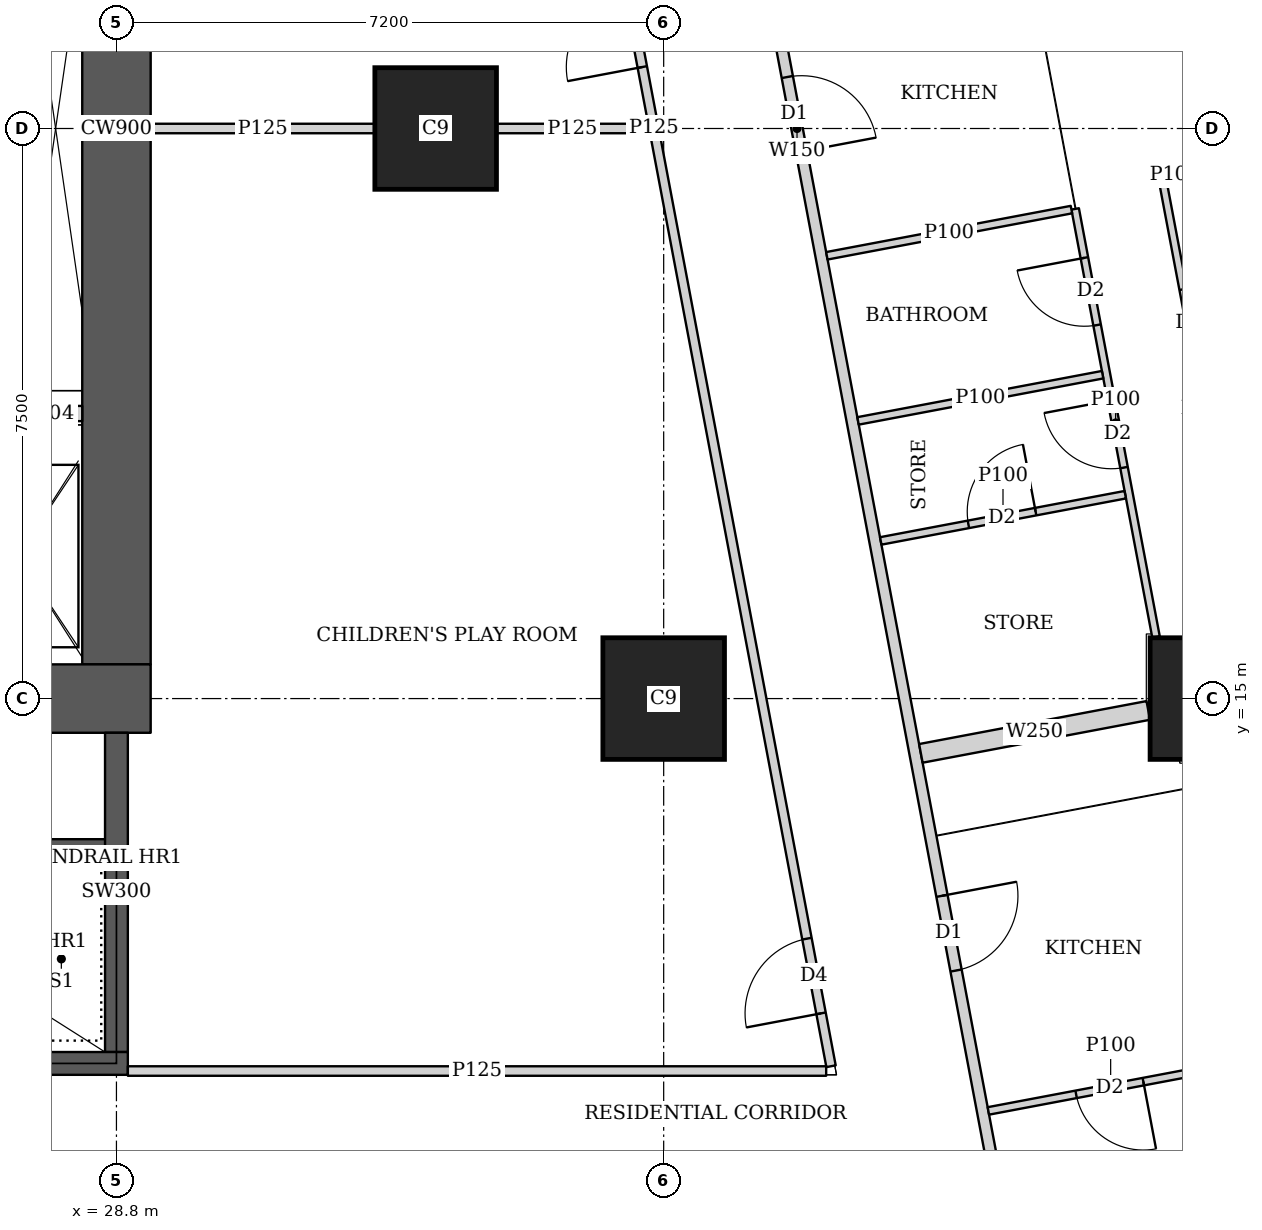
"""IFC4 building model, lengths in metres.
Left out: names, types, materials, properties, quantities, classifications, styles, units other than length and angle.
Written with IfcOpenShell. Run it as: python <this file> out.ifc"""

import sys

from ifc_helpers import new_model, si_unit, direction, frame, frame_2d, origin, origin_2d, place, context, subcontext, project, spatial, rectangle, extrude, element, fill, save


model = new_model("IFC4")
c1 = context("Model", 3, precision=1e-05, world=origin(), true_north=direction((0.0, 1.0)))
c2 = subcontext(c1, "Body", "Model", "MODEL_VIEW")
j1 = project(units=[si_unit("LENGTHUNIT", "METRE"), si_unit("PLANEANGLEUNIT", "RADIAN")], contexts=[c1])
p1 = place(None, origin())
s1 = spatial("IfcSite", under=j1, at=p1, CompositionType="ELEMENT")
p2 = place(p1, origin())
s2 = spatial("IfcBuilding", under=s1, at=p2, CompositionType="ELEMENT")
p3 = place(p2, frame((0.0, 0.0, 122.9)))
s3 = spatial("IfcBuildingStorey", under=s2, at=p3, CompositionType="ELEMENT", Elevation=122.9)
for number, where, z_axis, x_axis in (
    (1, (36.0, 15.0, 0.0), (0.0, 0.0, 1.0), (1.0, 0.0, 0.0)),
    (2, (43.2, 15.0, 0.0), (0.0, 0.0, 1.0), (1.0, 0.0, 0.0)),
    (3, (33.0, 22.5, 0.0), (0.0, 0.0, 1.0), (1.0, 0.0, 0.0)),
):
    element("IfcColumn", number, at=place(p3, frame(where, z_axis=z_axis, x_axis=x_axis)), inside=s3, PredefinedType="COLUMN", context=c2, shape_type="SweptSolid", body=[
        extrude(rectangle(XDim=1.6, YDim=1.6, at=origin_2d()), origin(), (0.0, 0.0, 1.0), 3.75),
    ])
p4 = place(p3, frame((13.95, 15.0, 0.0), z_axis=(0.0, 0.0, 1.0), x_axis=(1.0, 0.0, 0.0)))
e4 = element("IfcWall", 4, at=p4, inside=s3, PredefinedType="SHEAR", context=c2, shape_type="SweptSolid", body=[
    extrude(rectangle(XDim=15.3, YDim=0.9, at=frame_2d((7.65, 0.0))), origin(), (0.0, 0.0, 1.0), 3.75),
])
p5 = place(p4, frame((4.45, 0.0, 0.0)))
e5 = element("IfcOpeningElement", 5, at=p5, cuts=e4, PredefinedType="OPENING", context=c2, shape_type="SweptSolid", body=[
    extrude(rectangle(XDim=1.8, YDim=2.1, at=frame_2d((0.9, 1.05))), frame((0.0, 0.46, 0.0), z_axis=(0.0, -1.0, 0.0), x_axis=(1.0, 0.0, 0.0)), (0.0, 0.0, 1.0), 0.92),
])
p6 = place(p4, frame((10.7, 0.0, 0.0)))
e6 = element("IfcOpeningElement", 6, at=p6, cuts=e4, PredefinedType="OPENING", context=c2, shape_type="SweptSolid", body=[
    extrude(rectangle(XDim=1.1, YDim=2.1, at=frame_2d((0.55, 1.05))), frame((0.0, 0.46, 0.0), z_axis=(0.0, -1.0, 0.0), x_axis=(1.0, 0.0, 0.0)), (0.0, 0.0, 1.0), 0.92),
])
p7 = place(p3, frame((28.8, 15.45, 0.0), z_axis=(0.0, 0.0, 1.0), x_axis=(0.0, 1.0, 0.0)))
e7 = element("IfcWall", 7, at=p7, inside=s3, PredefinedType="SHEAR", context=c2, shape_type="SweptSolid", body=[
    extrude(rectangle(XDim=14.1, YDim=0.9, at=frame_2d((7.05, 0.0))), origin(), (0.0, 0.0, 1.0), 3.75),
])
p8 = place(p3, frame((21.45, 10.2, 0.0), z_axis=(0.0, 0.0, 1.0), x_axis=(1.0, 0.0, 0.0)))
e8 = element("IfcWall", 8, at=p8, inside=s3, PredefinedType="SHEAR", context=c2, shape_type="SweptSolid", body=[
    extrude(rectangle(XDim=7.5, YDim=0.3, at=frame_2d((3.75, 0.0))), origin(), (0.0, 0.0, 1.0), 3.75),
])
p9 = place(p8, frame((0.5, 0.0, 0.0)))
e9 = element("IfcOpeningElement", 9, at=p9, cuts=e8, PredefinedType="OPENING", context=c2, shape_type="SweptSolid", body=[
    extrude(rectangle(XDim=1.1, YDim=2.1, at=frame_2d((0.55, 1.05))), frame((0.0, 0.16, 0.0), z_axis=(0.0, -1.0, 0.0), x_axis=(1.0, 0.0, 0.0)), (0.0, 0.0, 1.0), 0.32),
])
p10 = place(p3, frame((28.8, 10.35, 0.0), z_axis=(0.0, 0.0, 1.0), x_axis=(0.0, 1.0, 0.0)))
e10 = element("IfcWall", 10, at=p10, inside=s3, PredefinedType="SHEAR", context=c2, shape_type="SweptSolid", body=[
    extrude(rectangle(XDim=4.2, YDim=0.3, at=frame_2d((2.1, 0.0))), origin(), (0.0, 0.0, 1.0), 3.75),
])
p11 = place(p3, frame((33.382, 45.65, 0.0), z_axis=(0.0, 0.0, 1.0), x_axis=(0.185593544777, -0.982626600565, 0.0)))
e11 = element("IfcWall", 11, at=p11, inside=s3, PredefinedType="SOLIDWALL", context=c2, shape_type="SweptSolid", body=[
    extrude(rectangle(XDim=47.118, YDim=0.15, at=frame_2d((23.559, 0.0))), origin(), (0.0, 0.0, 1.0), 2.2),
])
p12 = place(p11, frame((10.662, 0.0, 0.0)))
e12 = element("IfcOpeningElement", 12, at=p12, cuts=e11, PredefinedType="OPENING", context=c2, shape_type="SweptSolid", body=[
    extrude(rectangle(XDim=1.0, YDim=2.1, at=frame_2d((0.5, 1.05))), frame((0.0, 0.085, 0.0), z_axis=(0.0, -1.0, 0.0), x_axis=(1.0, 0.0, 0.0)), (0.0, 0.0, 1.0), 0.17),
])
p13 = place(p11, frame((15.237, 0.0, 0.0)))
e13 = element("IfcOpeningElement", 13, at=p13, cuts=e11, PredefinedType="OPENING", context=c2, shape_type="SweptSolid", body=[
    extrude(rectangle(XDim=1.0, YDim=2.1, at=frame_2d((0.5, 1.05))), frame((0.0, 0.085, 0.0), z_axis=(0.0, -1.0, 0.0), x_axis=(1.0, 0.0, 0.0)), (0.0, 0.0, 1.0), 0.17),
])
p14 = place(p11, frame((22.87, 0.0, 0.0)))
e14 = element("IfcOpeningElement", 14, at=p14, cuts=e11, PredefinedType="OPENING", context=c2, shape_type="SweptSolid", body=[
    extrude(rectangle(XDim=1.0, YDim=2.1, at=frame_2d((0.5, 1.05))), frame((0.0, 0.085, 0.0), z_axis=(0.0, -1.0, 0.0), x_axis=(1.0, 0.0, 0.0)), (0.0, 0.0, 1.0), 0.17),
])
p15 = place(p11, frame((33.833, 0.0, 0.0)))
e15 = element("IfcOpeningElement", 15, at=p15, cuts=e11, PredefinedType="OPENING", context=c2, shape_type="SweptSolid", body=[
    extrude(rectangle(XDim=1.0, YDim=2.1, at=frame_2d((0.5, 1.05))), frame((0.0, 0.085, 0.0), z_axis=(0.0, -1.0, 0.0), x_axis=(1.0, 0.0, 0.0)), (0.0, 0.0, 1.0), 0.17),
])
p16 = place(p3, frame((42.566, 21.809, 0.0), z_axis=(0.0, 0.0, 1.0), x_axis=(0.18559218796, -0.982626856832, 0.0)))
e16 = element("IfcWall", 16, at=p16, inside=s3, PredefinedType="PARTITIONING", context=c2, shape_type="SweptSolid", body=[
    extrude(rectangle(XDim=6.105, YDim=0.1, at=frame_2d((3.052, 0.0))), origin(), (0.0, 0.0, 1.0), 2.5),
])
p17 = place(p16, frame((1.45, 0.0, 0.0)))
e17 = element("IfcOpeningElement", 17, at=p17, cuts=e16, PredefinedType="OPENING", context=c2, shape_type="SweptSolid", body=[
    extrude(rectangle(XDim=0.9, YDim=2.1, at=frame_2d((0.45, 1.05))), frame((0.0, 0.06, 0.0), z_axis=(0.0, -1.0, 0.0), x_axis=(1.0, 0.0, 0.0)), (0.0, 0.0, 1.0), 0.12),
])
p18 = place(p16, frame((4.163, 0.0, 0.0)))
e18 = element("IfcOpeningElement", 18, at=p18, cuts=e16, PredefinedType="OPENING", context=c2, shape_type="SweptSolid", body=[
    extrude(rectangle(XDim=0.9, YDim=2.1, at=frame_2d((0.45, 1.05))), frame((0.0, 0.06, 0.0), z_axis=(0.0, -1.0, 0.0), x_axis=(1.0, 0.0, 0.0)), (0.0, 0.0, 1.0), 0.12),
])
p19 = place(p3, frame((41.414, 21.442, 0.0), z_axis=(0.0, 0.0, 1.0), x_axis=(0.185636022079, -0.982618576716, 0.0)))
e19 = element("IfcWall", 19, at=p19, inside=s3, PredefinedType="PARTITIONING", context=c2, shape_type="SweptSolid", body=[
    extrude(rectangle(XDim=5.731, YDim=0.1, at=frame_2d((2.866, 0.0))), origin(), (0.0, 0.0, 1.0), 3.5),
])
p20 = place(p19, frame((0.655, 0.0, 0.0)))
e20 = element("IfcOpeningElement", 20, at=p20, cuts=e19, PredefinedType="OPENING", context=c2, shape_type="SweptSolid", body=[
    extrude(rectangle(XDim=0.9, YDim=2.1, at=frame_2d((0.45, 1.05))), frame((0.0, 0.06, 0.0), z_axis=(0.0, -1.0, 0.0), x_axis=(1.0, 0.0, 0.0)), (0.0, 0.0, 1.0), 0.12),
])
p21 = place(p19, frame((2.563, 0.0, 0.0)))
e21 = element("IfcOpeningElement", 21, at=p21, cuts=e19, PredefinedType="OPENING", context=c2, shape_type="SweptSolid", body=[
    extrude(rectangle(XDim=0.9, YDim=2.1, at=frame_2d((0.45, 1.05))), frame((0.0, 0.06, 0.0), z_axis=(0.0, -1.0, 0.0), x_axis=(1.0, 0.0, 0.0)), (0.0, 0.0, 1.0), 0.12),
])
p22 = place(p3, frame((42.887, 21.921, 0.0), z_axis=(0.0, 0.0, 1.0), x_axis=(-0.982274918032, -0.187445953293, 0.0)))
e22 = element("IfcWall", 22, at=p22, inside=s3, PredefinedType="PARTITIONING", context=c2, shape_type="SweptSolid", body=[
    extrude(rectangle(XDim=0.336, YDim=0.1, at=frame_2d((0.168, 0.0))), origin(), (0.0, 0.0, 1.0), 2.5),
])
p23 = place(p3, frame((41.365, 21.433, 0.0), z_axis=(0.0, 0.0, 1.0), x_axis=(-0.982607026909, -0.185697147715, 0.0)))
e23 = element("IfcWall", 23, at=p23, inside=s3, PredefinedType="PARTITIONING", context=c2, shape_type="SweptSolid", body=[
    extrude(rectangle(XDim=3.275, YDim=0.1, at=frame_2d((1.637, 0.0))), origin(), (0.0, 0.0, 1.0), 3.5),
])
p24 = place(p3, frame((42.073, 17.682, 0.0), z_axis=(0.0, 0.0, 1.0), x_axis=(-0.982610347627, -0.185679575441, 0.0)))
e24 = element("IfcWall", 24, at=p24, inside=s3, PredefinedType="PARTITIONING", context=c2, shape_type="SweptSolid", body=[
    extrude(rectangle(XDim=3.274, YDim=0.1, at=frame_2d((1.637, 0.0))), origin(), (0.0, 0.0, 1.0), 3.5),
])
p25 = place(p24, frame((1.2, 0.0, 0.0)))
e25 = element("IfcOpeningElement", 25, at=p25, cuts=e24, PredefinedType="OPENING", context=c2, shape_type="SweptSolid", body=[
    extrude(rectangle(XDim=0.9, YDim=2.1, at=frame_2d((0.45, 1.05))), frame((0.0, 0.06, 0.0), z_axis=(0.0, -1.0, 0.0), x_axis=(1.0, 0.0, 0.0)), (0.0, 0.0, 1.0), 0.12),
])
p26 = place(p3, frame((41.775, 19.261, 0.0), z_axis=(0.0, 0.0, 1.0), x_axis=(-0.982620626894, -0.185625169636, 0.0)))
e26 = element("IfcWall", 26, at=p26, inside=s3, PredefinedType="PARTITIONING", context=c2, shape_type="SweptSolid", body=[
    extrude(rectangle(XDim=3.275, YDim=0.1, at=frame_2d((1.637, 0.0))), origin(), (0.0, 0.0, 1.0), 3.5),
])
p27 = place(p3, frame((43.49, 10.183, 0.0), z_axis=(0.0, 0.0, 1.0), x_axis=(-0.982607026909, -0.185697147715, 0.0)))
e27 = element("IfcWall", 27, at=p27, inside=s3, PredefinedType="PARTITIONING", context=c2, shape_type="SweptSolid", body=[
    extrude(rectangle(XDim=3.275, YDim=0.1, at=frame_2d((1.637, 0.0))), origin(), (0.0, 0.0, 1.0), 3.5),
])
p28 = place(p27, frame((1.2, 0.0, 0.0)))
e28 = element("IfcOpeningElement", 28, at=p28, cuts=e27, PredefinedType="OPENING", context=c2, shape_type="SweptSolid", body=[
    extrude(rectangle(XDim=0.9, YDim=2.1, at=frame_2d((0.45, 1.05))), frame((0.0, 0.06, 0.0), z_axis=(0.0, -1.0, 0.0), x_axis=(1.0, 0.0, 0.0)), (0.0, 0.0, 1.0), 0.12),
])
p29 = place(p3, frame((42.376, 14.844, 0.0), z_axis=(0.0, 0.0, 1.0), x_axis=(-0.982636286056, -0.185542257522, 0.0)))
e29 = element("IfcWall", 29, at=p29, inside=s3, PredefinedType="SOLIDWALL", context=c2, shape_type="SweptSolid", body=[
    extrude(rectangle(XDim=3.045, YDim=0.25, at=frame_2d((1.522, 0.0))), origin(), (0.0, 0.0, 1.0), 3.5),
])
p30 = place(p3, frame((28.95, 10.1, 0.0), z_axis=(0.0, 0.0, 1.0), x_axis=(1.0, 0.0, 0.0)))
e30 = element("IfcWall", 30, at=p30, inside=s3, PredefinedType="PARTITIONING", context=c2, shape_type="SweptSolid", body=[
    extrude(rectangle(XDim=9.188, YDim=0.125, at=frame_2d((4.594, 0.0))), origin(), (0.0, 0.0, 1.0), 3.5),
])
p31 = place(p3, frame((38.202, 10.163, 0.0), z_axis=(0.0, 0.0, 1.0), x_axis=(-0.185610321132, 0.982623431783, 0.0)))
e31 = element("IfcWall", 31, at=p31, inside=s3, PredefinedType="PARTITIONING", context=c2, shape_type="SweptSolid", body=[
    extrude(rectangle(XDim=25.111, YDim=0.125, at=frame_2d((12.556, 0.0))), origin(), (0.0, 0.0, 1.0), 2.5),
])
p32 = place(p31, frame((0.708, 0.0, 0.0)))
e32 = element("IfcOpeningElement", 32, at=p32, cuts=e31, PredefinedType="OPENING", context=c2, shape_type="SweptSolid", body=[
    extrude(rectangle(XDim=1.0, YDim=2.1, at=frame_2d((0.5, 1.05))), frame((0.0, 0.073, 0.0), z_axis=(0.0, -1.0, 0.0), x_axis=(1.0, 0.0, 0.0)), (0.0, 0.0, 1.0), 0.145),
])
p33 = place(p31, frame((13.378, 0.0, 0.0)))
e33 = element("IfcOpeningElement", 33, at=p33, cuts=e31, PredefinedType="OPENING", context=c2, shape_type="SweptSolid", body=[
    extrude(rectangle(XDim=1.0, YDim=2.1, at=frame_2d((0.5, 1.05))), frame((0.0, 0.073, 0.0), z_axis=(0.0, -1.0, 0.0), x_axis=(1.0, 0.0, 0.0)), (0.0, 0.0, 1.0), 0.145),
])
p34 = place(p31, frame((21.25, 0.0, 0.0)))
e34 = element("IfcOpeningElement", 34, at=p34, cuts=e31, PredefinedType="OPENING", context=c2, shape_type="SweptSolid", body=[
    extrude(rectangle(XDim=1.0, YDim=2.1, at=frame_2d((0.5, 1.05))), frame((0.0, 0.073, 0.0), z_axis=(0.0, -1.0, 0.0), x_axis=(1.0, 0.0, 0.0)), (0.0, 0.0, 1.0), 0.145),
])
p35 = place(p31, frame((23.453, 0.0, 0.0)))
e35 = element("IfcOpeningElement", 35, at=p35, cuts=e31, PredefinedType="OPENING", context=c2, shape_type="SweptSolid", body=[
    extrude(rectangle(XDim=1.0, YDim=2.1, at=frame_2d((0.5, 1.05))), frame((0.0, 0.073, 0.0), z_axis=(0.0, -1.0, 0.0), x_axis=(1.0, 0.0, 0.0)), (0.0, 0.0, 1.0), 0.145),
])
p36 = place(p3, frame((29.25, 22.5, 0.0), z_axis=(0.0, 0.0, 1.0), x_axis=(1.0, 0.0, 0.0)))
e36 = element("IfcWall", 36, at=p36, inside=s3, PredefinedType="PARTITIONING", context=c2, shape_type="SweptSolid", body=[
    extrude(rectangle(XDim=2.949, YDim=0.125, at=frame_2d((1.475, 0.0))), origin(), (0.0, 0.0, 1.0), 3.5),
])
p37 = place(p3, frame((33.801, 22.5, 0.0), z_axis=(0.0, 0.0, 1.0), x_axis=(1.0, 0.0, 0.0)))
e37 = element("IfcWall", 37, at=p37, inside=s3, PredefinedType="PARTITIONING", context=c2, shape_type="SweptSolid", body=[
    extrude(rectangle(XDim=1.995, YDim=0.125, at=frame_2d((0.998, 0.0))), origin(), (0.0, 0.0, 1.0), 2.5),
])
p38 = place(p3, frame((23.0, 13.05, 0.0), z_axis=(0.0, 0.0, 1.0), x_axis=(1.0, 0.0, 0.0)))
e38 = element("IfcWall", 38, at=p38, inside=s3, PredefinedType="SHEAR", context=c2, shape_type="SweptSolid", body=[
    extrude(rectangle(XDim=5.8, YDim=0.2, at=frame_2d((2.9, 0.0))), origin(), (0.0, 0.0, 1.0), 3.75),
])
p39 = place(p3, frame((27.4, 18.75, 0.0), z_axis=(0.0, 0.0, 1.0), x_axis=(1.0, 0.0, 0.0)))
e39 = element("IfcWall", 39, at=p39, inside=s3, PredefinedType="SOLIDWALL", context=c2, shape_type="SweptSolid", body=[
    extrude(rectangle(XDim=0.95, YDim=0.2, at=frame_2d((0.475, 0.0))), origin(), (0.0, 0.0, 1.0), 3.5),
])
p40 = place(p17, origin())
e40 = element("IfcDoor", 40, at=p40, inside=s3, OperationType="SINGLE_SWING_LEFT", PredefinedType="DOOR", context=c2, shape_type="SweptSolid", body=[
    extrude(rectangle(XDim=0.9, YDim=2.1, at=frame_2d((0.45, 1.05))), frame((0.0, 0.025, 0.0), z_axis=(0.0, -1.0, 0.0), x_axis=(1.0, 0.0, 0.0)), (0.0, 0.0, 1.0), 0.05),
])
fill(e17, e40)
p41 = place(p20, origin())
e41 = element("IfcDoor", 41, at=p41, inside=s3, OperationType="SINGLE_SWING_RIGHT", PredefinedType="DOOR", context=c2, shape_type="SweptSolid", body=[
    extrude(rectangle(XDim=0.9, YDim=2.1, at=frame_2d((0.45, 1.05))), frame((0.0, 0.025, 0.0), z_axis=(0.0, -1.0, 0.0), x_axis=(1.0, 0.0, 0.0)), (0.0, 0.0, 1.0), 0.05),
])
fill(e20, e41)
p42 = place(p21, origin())
e42 = element("IfcDoor", 42, at=p42, inside=s3, OperationType="SINGLE_SWING_RIGHT", PredefinedType="DOOR", context=c2, shape_type="SweptSolid", body=[
    extrude(rectangle(XDim=0.9, YDim=2.1, at=frame_2d((0.45, 1.05))), frame((0.0, 0.025, 0.0), z_axis=(0.0, -1.0, 0.0), x_axis=(1.0, 0.0, 0.0)), (0.0, 0.0, 1.0), 0.05),
])
fill(e21, e42)
p43 = place(p14, origin())
e43 = element("IfcDoor", 43, at=p43, inside=s3, OperationType="SINGLE_SWING_RIGHT", PredefinedType="DOOR", context=c2, shape_type="SweptSolid", body=[
    extrude(rectangle(XDim=1.0, YDim=2.1, at=frame_2d((0.5, 1.05))), frame((0.0, 0.025, 0.0), z_axis=(0.0, -1.0, 0.0), x_axis=(1.0, 0.0, 0.0)), (0.0, 0.0, 1.0), 0.05),
])
fill(e14, e43)
p44 = place(p15, origin())
e44 = element("IfcDoor", 44, at=p44, inside=s3, OperationType="SINGLE_SWING_LEFT", PredefinedType="DOOR", context=c2, shape_type="SweptSolid", body=[
    extrude(rectangle(XDim=1.0, YDim=2.1, at=frame_2d((0.5, 1.05))), frame((0.0, 0.025, 0.0), z_axis=(0.0, -1.0, 0.0), x_axis=(1.0, 0.0, 0.0)), (0.0, 0.0, 1.0), 0.05),
])
fill(e15, e44)
p45 = place(p28, origin())
e45 = element("IfcDoor", 45, at=p45, inside=s3, OperationType="SINGLE_SWING_LEFT", PredefinedType="DOOR", context=c2, shape_type="SweptSolid", body=[
    extrude(rectangle(XDim=0.9, YDim=2.1, at=frame_2d((0.45, 1.05))), frame((0.0, 0.025, 0.0), z_axis=(0.0, -1.0, 0.0), x_axis=(1.0, 0.0, 0.0)), (0.0, 0.0, 1.0), 0.05),
])
fill(e28, e45)
p46 = place(p25, origin())
e46 = element("IfcDoor", 46, at=p46, inside=s3, OperationType="SINGLE_SWING_RIGHT", PredefinedType="DOOR", context=c2, shape_type="SweptSolid", body=[
    extrude(rectangle(XDim=0.9, YDim=2.1, at=frame_2d((0.45, 1.05))), frame((0.0, 0.025, 0.0), z_axis=(0.0, -1.0, 0.0), x_axis=(1.0, 0.0, 0.0)), (0.0, 0.0, 1.0), 0.05),
])
fill(e25, e46)
p47 = place(p32, origin())
e47 = element("IfcDoor", 47, at=p47, inside=s3, OperationType="SINGLE_SWING_LEFT", PredefinedType="DOOR", context=c2, shape_type="SweptSolid", body=[
    extrude(rectangle(XDim=1.0, YDim=2.1, at=frame_2d((0.5, 1.05))), frame((0.0, 0.025, 0.0), z_axis=(0.0, -1.0, 0.0), x_axis=(1.0, 0.0, 0.0)), (0.0, 0.0, 1.0), 0.05),
])
fill(e32, e47)
p48 = place(p33, origin())
e48 = element("IfcDoor", 48, at=p48, inside=s3, OperationType="SINGLE_SWING_LEFT", PredefinedType="DOOR", context=c2, shape_type="SweptSolid", body=[
    extrude(rectangle(XDim=1.0, YDim=2.1, at=frame_2d((0.5, 1.05))), frame((0.0, 0.025, 0.0), z_axis=(0.0, -1.0, 0.0), x_axis=(1.0, 0.0, 0.0)), (0.0, 0.0, 1.0), 0.05),
])
fill(e33, e48)
save(model, sys.argv[1])
